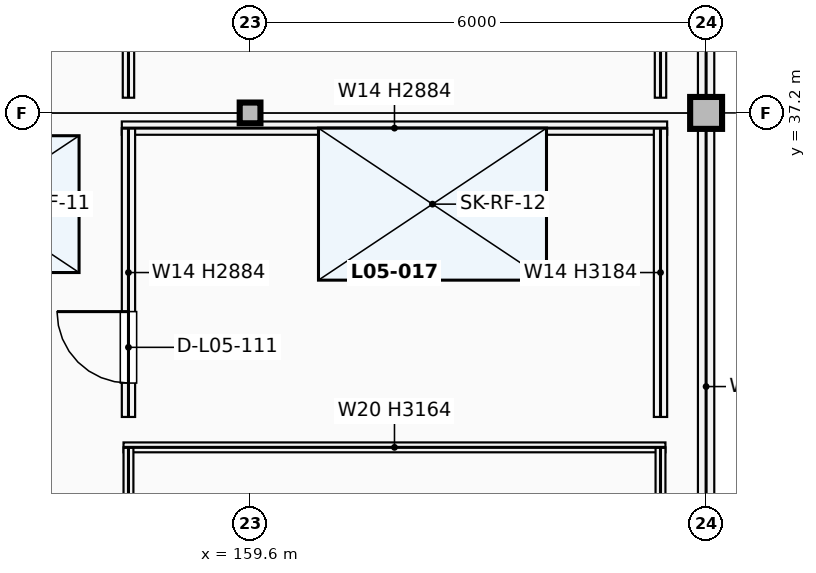
"""IFC4 building model, lengths in metres.
Left out: names, types, materials, properties, quantities, classifications, styles, units other than length and angle.
Written with IfcOpenShell. Run it as: python <this file> out.ifc"""

import sys

from ifc_helpers import new_model, si_unit, direction, frame, frame_2d, origin, origin_2d, place, context, subcontext, project, spatial, rectangle, hollow_circle, extrude, element, fill, save


model = new_model("IFC4")
c1 = context("Model", 3, precision=1e-05, world=origin(), true_north=direction((0.0, 1.0)))
c2 = subcontext(c1, "Body", "Model", "MODEL_VIEW")
j1 = project(units=[si_unit("LENGTHUNIT", "METRE"), si_unit("PLANEANGLEUNIT", "RADIAN")], contexts=[c1])
p1 = place(None, origin())
s1 = spatial("IfcSite", under=j1, at=p1, CompositionType="ELEMENT")
p2 = place(p1, origin())
s2 = spatial("IfcBuilding", under=s1, at=p2, CompositionType="ELEMENT")
p3 = place(p2, frame((0.0, 0.0, 21.08)))
s3 = spatial("IfcBuildingStorey", under=s2, at=p3, CompositionType="ELEMENT", Elevation=21.08)
p4 = place(p3, frame((159.6, 37.2, 0.0), z_axis=(0.0, 0.0, 1.0), x_axis=(1.0, 0.0, 0.0)))
e1 = element("IfcColumn", 1, at=p4, inside=s3, PredefinedType="COLUMN", context=c2, shape_type="SweptSolid", body=[
    extrude(hollow_circle(Radius=0.136, WallThickness=0.012, at=origin_2d()), origin(), (0.0, 0.0, 1.0), 3.7),
])
p5 = place(p3, frame((165.6, 37.2, 0.0), z_axis=(0.0, 0.0, 1.0), x_axis=(1.0, 0.0, 0.0)))
e2 = element("IfcColumn", 2, at=p5, inside=s3, PredefinedType="COLUMN", context=c2, shape_type="SweptSolid", body=[
    extrude(rectangle(XDim=0.42, YDim=0.42, at=origin_2d()), origin(), (0.0, 0.0, 1.0), 3.74),
])
p6 = place(p3, frame((165.6, 30.212, 0.0), z_axis=(0.0, 0.0, 1.0), x_axis=(0.0, 1.0, 0.0)))
e3 = element("IfcWall", 3, at=p6, inside=s3, PredefinedType="SOLIDWALL", context=c2, shape_type="SweptSolid", body=[
    extrude(rectangle(XDim=6.776, YDim=0.215, at=frame_2d((3.388, 0.0))), origin(), (0.0, 0.0, 1.0), 3.074),
])
p7 = place(p3, frame((165.6, 37.412, 0.0), z_axis=(0.0, 0.0, 1.0), x_axis=(0.0, 1.0, 0.0)))
e4 = element("IfcWall", 4, at=p7, inside=s3, PredefinedType="SOLIDWALL", context=c2, shape_type="SweptSolid", body=[
    extrude(rectangle(XDim=6.776, YDim=0.215, at=frame_2d((3.388, 0.0))), origin(), (0.0, 0.0, 1.0), 3.074),
])
p8 = place(p3, frame((157.935, 32.8, 0.0), z_axis=(0.0, 0.0, 1.0), x_axis=(1.0, 0.0, 0.0)))
e5 = element("IfcWall", 5, at=p8, inside=s3, PredefinedType="PARTITIONING", context=c2, shape_type="SweptSolid", body=[
    extrude(rectangle(XDim=7.13, YDim=0.13, at=frame_2d((3.565, 0.0))), origin(), (0.0, 0.0, 1.0), 3.164),
])
p9 = place(p3, frame((158.0, 24.2, 0.0), z_axis=(0.0, 0.0, 1.0), x_axis=(0.0, 1.0, 0.0)))
e6 = element("IfcWall", 6, at=p9, inside=s3, PredefinedType="PARTITIONING", context=c2, shape_type="SweptSolid", body=[
    extrude(rectangle(XDim=8.6, YDim=0.13, at=frame_2d((4.3, 0.0))), origin(), (0.0, 0.0, 1.0), 2.884),
])
p10 = place(p9, frame((1.905, 0.0, 0.0)))
e7 = element("IfcOpeningElement", 7, at=p10, cuts=e6, PredefinedType="OPENING", context=c2, shape_type="SweptSolid", body=[
    extrude(rectangle(XDim=1.38, YDim=2.28, at=frame_2d((0.69, 1.14))), frame((0.0, 0.075, 0.0), z_axis=(0.0, -1.0, 0.0), x_axis=(1.0, 0.0, 0.0)), (0.0, 0.0, 1.0), 0.15),
])
p11 = place(p3, frame((165.0, 24.2, 0.0), z_axis=(0.0, 0.0, 1.0), x_axis=(0.0, 1.0, 0.0)))
e8 = element("IfcWall", 8, at=p11, inside=s3, PredefinedType="PARTITIONING", context=c2, shape_type="SweptSolid", body=[
    extrude(rectangle(XDim=8.6, YDim=0.13, at=frame_2d((4.3, 0.0))), origin(), (0.0, 0.0, 1.0), 3.184),
])
p12 = place(p3, frame((157.913, 37.0, 0.0), z_axis=(0.0, 0.0, 1.0), x_axis=(1.0, 0.0, 0.0)))
e9 = element("IfcWall", 9, at=p12, inside=s3, PredefinedType="PARTITIONING", context=c2, shape_type="SweptSolid", body=[
    extrude(rectangle(XDim=7.175, YDim=0.175, at=frame_2d((3.587, 0.0))), origin(), (0.0, 0.0, 1.0), 2.884),
])
p13 = place(p3, frame((158.0, 33.2, 0.0), z_axis=(0.0, 0.0, 1.0), x_axis=(0.0, 1.0, 0.0)))
e10 = element("IfcWall", 10, at=p13, inside=s3, PredefinedType="PARTITIONING", context=c2, shape_type="SweptSolid", body=[
    extrude(rectangle(XDim=3.8, YDim=0.175, at=frame_2d((1.9, 0.0))), origin(), (0.0, 0.0, 1.0), 2.884),
])
p14 = place(p13, frame((0.446, 0.0, 0.0)))
e11 = element("IfcOpeningElement", 11, at=p14, cuts=e10, PredefinedType="OPENING", context=c2, shape_type="SweptSolid", body=[
    extrude(rectangle(XDim=0.94, YDim=2.1, at=frame_2d((0.47, 1.05))), frame((0.0, 0.098, 0.0), z_axis=(0.0, -1.0, 0.0), x_axis=(1.0, 0.0, 0.0)), (0.0, 0.0, 1.0), 0.195),
])
p15 = place(p3, frame((165.0, 33.2, 0.0), z_axis=(0.0, 0.0, 1.0), x_axis=(0.0, 1.0, 0.0)))
e12 = element("IfcWall", 12, at=p15, inside=s3, PredefinedType="PARTITIONING", context=c2, shape_type="SweptSolid", body=[
    extrude(rectangle(XDim=3.8, YDim=0.175, at=frame_2d((1.9, 0.0))), origin(), (0.0, 0.0, 1.0), 3.184),
])
p16 = place(p3, frame((158.0, 37.4, 0.0), z_axis=(0.0, 0.0, 1.0), x_axis=(0.0, 1.0, 0.0)))
e13 = element("IfcWall", 13, at=p16, inside=s3, PredefinedType="PARTITIONING", context=c2, shape_type="SweptSolid", body=[
    extrude(rectangle(XDim=3.4, YDim=0.15, at=frame_2d((1.7, 0.0))), origin(), (0.0, 0.0, 1.0), 2.884),
])
p17 = place(p16, frame((1.982, 0.0, 0.0)))
e14 = element("IfcOpeningElement", 14, at=p17, cuts=e13, PredefinedType="OPENING", context=c2, shape_type="SweptSolid", body=[
    extrude(rectangle(XDim=1.02, YDim=2.18, at=frame_2d((0.51, 1.09))), frame((0.0, 0.085, 0.0), z_axis=(0.0, -1.0, 0.0), x_axis=(1.0, 0.0, 0.0)), (0.0, 0.0, 1.0), 0.17),
])
p18 = place(p3, frame((165.0, 37.4, 0.0), z_axis=(0.0, 0.0, 1.0), x_axis=(0.0, 1.0, 0.0)))
e15 = element("IfcWall", 15, at=p18, inside=s3, PredefinedType="PARTITIONING", context=c2, shape_type="SweptSolid", body=[
    extrude(rectangle(XDim=3.4, YDim=0.15, at=frame_2d((1.7, 0.0))), origin(), (0.0, 0.0, 1.0), 3.184),
])
p19 = place(p2, frame((0.0, 0.0, 24.82)))
p20 = place(p19, frame((0.0, 0.0, -0.18)))
p21 = place(p20, frame((156.0, 36.0, 0.12)))
e16 = element("IfcWindow", 16, at=p21, inside=s3, PartitioningType="SINGLE_PANEL", PredefinedType="SKYLIGHT", context=c2, shape_type="SweptSolid", body=[
    extrude(rectangle(XDim=2.7, YDim=1.8, at=origin_2d()), origin(), (0.0, 0.0, 1.0), 0.06),
])
p22 = place(p20, frame((162.0, 36.0, 0.12)))
e17 = element("IfcWindow", 17, at=p22, inside=s3, PartitioningType="SINGLE_PANEL", PredefinedType="SKYLIGHT", context=c2, shape_type="SweptSolid", body=[
    extrude(rectangle(XDim=3.0, YDim=2.0, at=origin_2d()), origin(), (0.0, 0.0, 1.0), 0.06),
])
p23 = place(p14, origin())
e18 = element("IfcDoor", 18, at=p23, inside=s3, OperationType="SINGLE_SWING_RIGHT", PredefinedType="DOOR", context=c2, shape_type="SweptSolid", body=[
    extrude(rectangle(XDim=0.94, YDim=2.1, at=frame_2d((0.47, 1.05))), frame((0.0, 0.025, 0.0), z_axis=(0.0, -1.0, 0.0), x_axis=(1.0, 0.0, 0.0)), (0.0, 0.0, 1.0), 0.05),
])
fill(e11, e18)
save(model, sys.argv[1])
